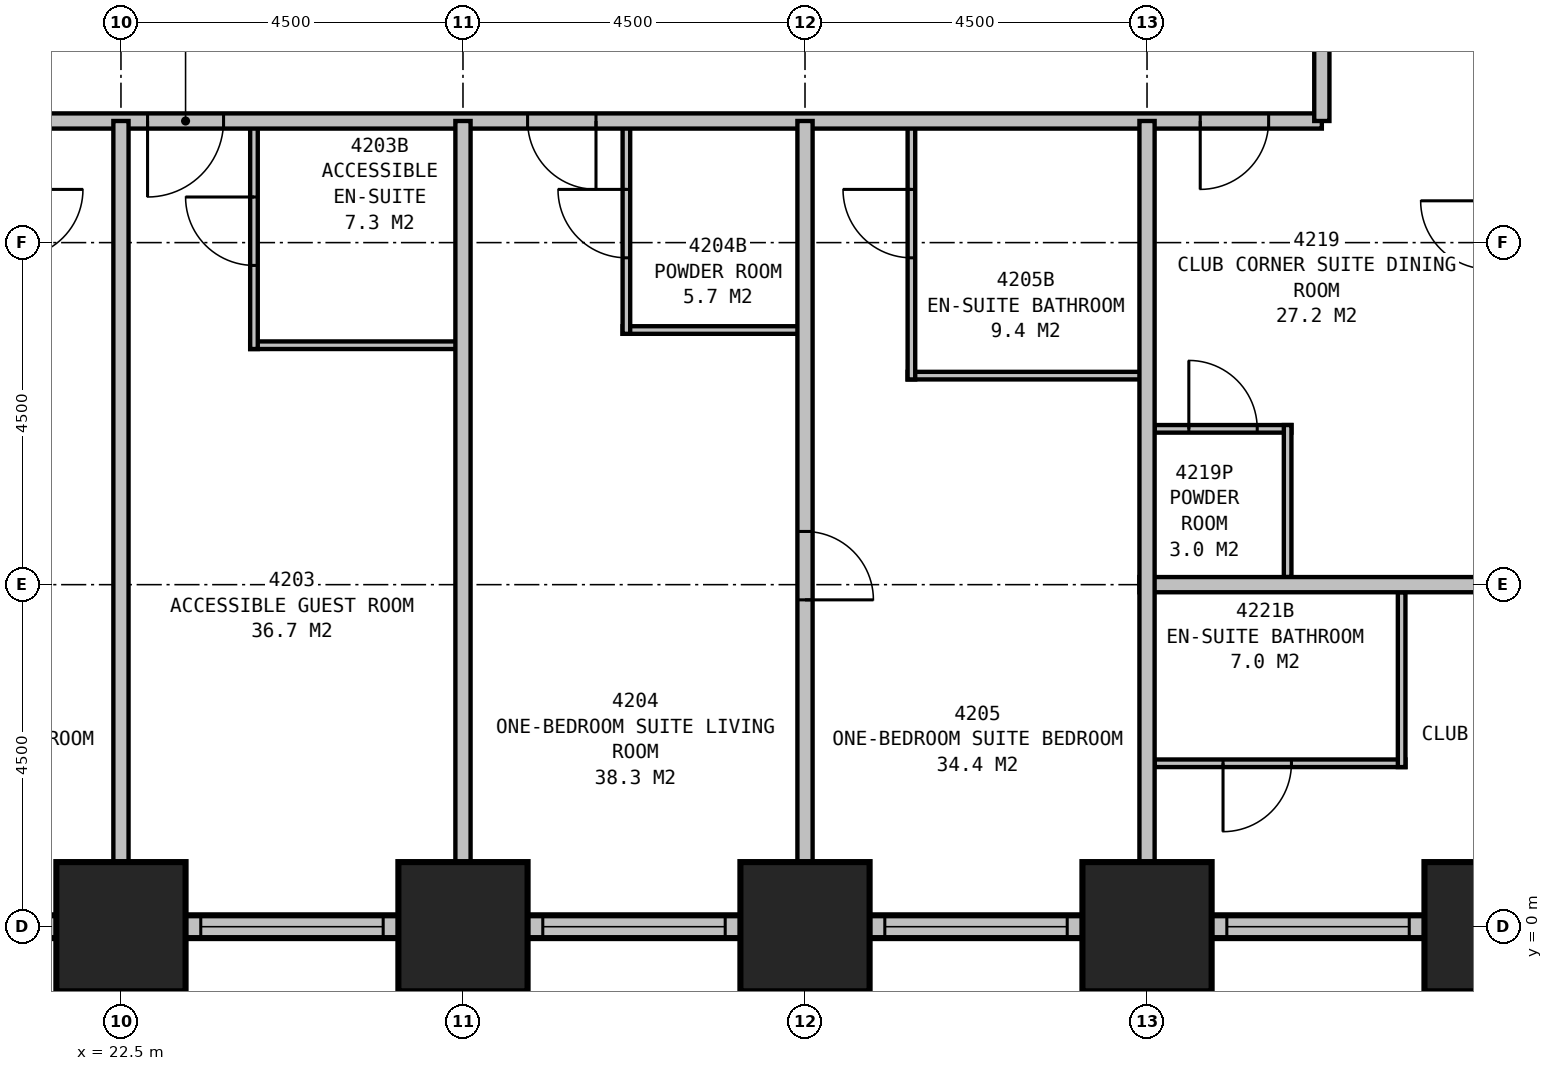
"""IFC4 building model, lengths in metres.
Left out: names, types, materials, properties, quantities, classifications, styles, units other than length and angle.
Written with IfcOpenShell. Run it as: python <this file> out.ifc"""

import sys

from ifc_helpers import new_model, si_unit, direction, frame, frame_2d, origin, origin_2d, place, context, subcontext, project, spatial, rectangle, extrude, element, fill, save


model = new_model("IFC4")
c1 = context("Model", 3, precision=1e-05, world=origin(), true_north=direction((0.0, 1.0)))
c2 = subcontext(c1, "Body", "Model", "MODEL_VIEW")
j1 = project(units=[si_unit("LENGTHUNIT", "METRE"), si_unit("PLANEANGLEUNIT", "RADIAN")], contexts=[c1])
p1 = place(None, origin())
s1 = spatial("IfcSite", under=j1, at=p1, CompositionType="ELEMENT")
p2 = place(p1, origin())
s2 = spatial("IfcBuilding", under=s1, at=p2, CompositionType="ELEMENT")
p3 = place(p2, frame((0.0, 0.0, 165.9)))
s3 = spatial("IfcBuildingStorey", under=s2, at=p3, CompositionType="ELEMENT", Elevation=165.9)
for number, where, z_axis, x_axis in (
    (1, (22.5, 0.0, 0.0), (0.0, 0.0, 1.0), (1.0, 0.0, 0.0)),
    (2, (27.0, 0.0, 0.0), (0.0, 0.0, 1.0), (1.0, 0.0, 0.0)),
    (3, (31.5, 0.0, 0.0), (0.0, 0.0, 1.0), (1.0, 0.0, 0.0)),
    (4, (36.0, 0.0, 0.0), (0.0, 0.0, 1.0), (1.0, 0.0, 0.0)),
    (5, (40.5, 0.0, 0.0), (0.0, 0.0, 1.0), (1.0, 0.0, 0.0)),
):
    element("IfcColumn", number, at=place(p3, frame(where, z_axis=z_axis, x_axis=x_axis)), inside=s3, PredefinedType="COLUMN", context=c2, shape_type="SweptSolid", body=[
        extrude(rectangle(XDim=1.7, YDim=1.7, at=origin_2d()), origin(), (0.0, 0.0, 1.0), 3.5),
    ])
p4 = place(p3, frame((8.85, 0.0, 0.0), z_axis=(0.0, 0.0, 1.0), x_axis=(1.0, 0.0, 0.0)))
e6 = element("IfcWall", 6, at=p4, inside=s3, PredefinedType="STANDARD", context=c2, shape_type="SweptSolid", body=[
    extrude(rectangle(XDim=36.3, YDim=0.3, at=frame_2d((18.15, 0.0))), origin(), (0.0, 0.0, 1.0), 2.25),
])
p5 = place(p4, frame((1.65, 0.0, 0.5)))
e7 = element("IfcOpeningElement", 7, at=p5, cuts=e6, PredefinedType="OPENING", context=c2, shape_type="SweptSolid", body=[
    extrude(rectangle(XDim=1.5, YDim=1.6, at=frame_2d((0.75, 0.8))), frame((0.0, 0.16, 0.0), z_axis=(0.0, -1.0, 0.0), x_axis=(1.0, 0.0, 0.0)), (0.0, 0.0, 1.0), 0.32),
])
p6 = place(p4, frame((5.7, 0.0, 0.5)))
e8 = element("IfcOpeningElement", 8, at=p6, cuts=e6, PredefinedType="OPENING", context=c2, shape_type="SweptSolid", body=[
    extrude(rectangle(XDim=2.4, YDim=1.6, at=frame_2d((1.2, 0.8))), frame((0.0, 0.16, 0.0), z_axis=(0.0, -1.0, 0.0), x_axis=(1.0, 0.0, 0.0)), (0.0, 0.0, 1.0), 0.32),
])
p7 = place(p4, frame((10.2, 0.0, 0.5)))
e9 = element("IfcOpeningElement", 9, at=p7, cuts=e6, PredefinedType="OPENING", context=c2, shape_type="SweptSolid", body=[
    extrude(rectangle(XDim=2.4, YDim=1.6, at=frame_2d((1.2, 0.8))), frame((0.0, 0.16, 0.0), z_axis=(0.0, -1.0, 0.0), x_axis=(1.0, 0.0, 0.0)), (0.0, 0.0, 1.0), 0.32),
])
p8 = place(p4, frame((14.7, 0.0, 0.5)))
e10 = element("IfcOpeningElement", 10, at=p8, cuts=e6, PredefinedType="OPENING", context=c2, shape_type="SweptSolid", body=[
    extrude(rectangle(XDim=2.4, YDim=1.6, at=frame_2d((1.2, 0.8))), frame((0.0, 0.16, 0.0), z_axis=(0.0, -1.0, 0.0), x_axis=(1.0, 0.0, 0.0)), (0.0, 0.0, 1.0), 0.32),
])
p9 = place(p4, frame((19.2, 0.0, 0.5)))
e11 = element("IfcOpeningElement", 11, at=p9, cuts=e6, PredefinedType="OPENING", context=c2, shape_type="SweptSolid", body=[
    extrude(rectangle(XDim=2.4, YDim=1.6, at=frame_2d((1.2, 0.8))), frame((0.0, 0.16, 0.0), z_axis=(0.0, -1.0, 0.0), x_axis=(1.0, 0.0, 0.0)), (0.0, 0.0, 1.0), 0.32),
])
p10 = place(p4, frame((23.7, 0.0, 0.5)))
e12 = element("IfcOpeningElement", 12, at=p10, cuts=e6, PredefinedType="OPENING", context=c2, shape_type="SweptSolid", body=[
    extrude(rectangle(XDim=2.4, YDim=1.6, at=frame_2d((1.2, 0.8))), frame((0.0, 0.16, 0.0), z_axis=(0.0, -1.0, 0.0), x_axis=(1.0, 0.0, 0.0)), (0.0, 0.0, 1.0), 0.32),
])
p11 = place(p4, frame((28.2, 0.0, 0.5)))
e13 = element("IfcOpeningElement", 13, at=p11, cuts=e6, PredefinedType="OPENING", context=c2, shape_type="SweptSolid", body=[
    extrude(rectangle(XDim=2.4, YDim=1.6, at=frame_2d((1.2, 0.8))), frame((0.0, 0.16, 0.0), z_axis=(0.0, -1.0, 0.0), x_axis=(1.0, 0.0, 0.0)), (0.0, 0.0, 1.0), 0.32),
])
p12 = place(p4, frame((32.7, 0.0, 0.5)))
e14 = element("IfcOpeningElement", 14, at=p12, cuts=e6, PredefinedType="OPENING", context=c2, shape_type="SweptSolid", body=[
    extrude(rectangle(XDim=2.4, YDim=1.6, at=frame_2d((1.2, 0.8))), frame((0.0, 0.16, 0.0), z_axis=(0.0, -1.0, 0.0), x_axis=(1.0, 0.0, 0.0)), (0.0, 0.0, 1.0), 0.32),
])
p13 = place(p3, frame((11.2, 10.6, 0.0), z_axis=(0.0, 0.0, 1.0), x_axis=(1.0, 0.0, 0.0)))
e15 = element("IfcWall", 15, at=p13, inside=s3, PredefinedType="PARTITIONING", context=c2, shape_type="SweptSolid", body=[
    extrude(rectangle(XDim=27.1, YDim=0.2, at=frame_2d((13.55, 0.0))), origin(), (0.0, 0.0, 1.0), 3.25),
])
p14 = place(p13, frame((4.05, 0.0, 0.0), z_axis=(0.0, 0.0, 1.0), x_axis=(-1.0, 0.0, 0.0)))
e16 = element("IfcOpeningElement", 16, at=p14, cuts=e15, PredefinedType="OPENING", context=c2, shape_type="SweptSolid", body=[
    extrude(rectangle(XDim=0.9, YDim=2.1, at=frame_2d((0.45, 1.05))), frame((0.0, 0.11, 0.0), z_axis=(0.0, -1.0, 0.0), x_axis=(1.0, 0.0, 0.0)), (0.0, 0.0, 1.0), 0.22),
])
p15 = place(p13, frame((12.65, 0.0, 0.0), z_axis=(0.0, 0.0, 1.0), x_axis=(-1.0, 0.0, 0.0)))
e17 = element("IfcOpeningElement", 17, at=p15, cuts=e15, PredefinedType="OPENING", context=c2, shape_type="SweptSolid", body=[
    extrude(rectangle(XDim=1.0, YDim=2.1, at=frame_2d((0.5, 1.05))), frame((0.0, 0.11, 0.0), z_axis=(0.0, -1.0, 0.0), x_axis=(1.0, 0.0, 0.0)), (0.0, 0.0, 1.0), 0.22),
])
p16 = place(p13, frame((17.55, 0.0, 0.0), z_axis=(0.0, 0.0, 1.0), x_axis=(-1.0, 0.0, 0.0)))
e18 = element("IfcOpeningElement", 18, at=p16, cuts=e15, PredefinedType="OPENING", context=c2, shape_type="SweptSolid", body=[
    extrude(rectangle(XDim=0.9, YDim=2.1, at=frame_2d((0.45, 1.05))), frame((0.0, 0.11, 0.0), z_axis=(0.0, -1.0, 0.0), x_axis=(1.0, 0.0, 0.0)), (0.0, 0.0, 1.0), 0.22),
])
p17 = place(p13, frame((1.6, 0.0, 0.0), z_axis=(0.0, 0.0, 1.0), x_axis=(-1.0, 0.0, 0.0)))
e19 = element("IfcOpeningElement", 19, at=p17, cuts=e15, PredefinedType="OPENING", context=c2, shape_type="SweptSolid", body=[
    extrude(rectangle(XDim=0.9, YDim=2.1, at=frame_2d((0.45, 1.05))), frame((0.0, 0.11, 0.0), z_axis=(0.0, -1.0, 0.0), x_axis=(1.0, 0.0, 0.0)), (0.0, 0.0, 1.0), 0.22),
])
p18 = place(p13, frame((26.4, 0.0, 0.0), z_axis=(0.0, 0.0, 1.0), x_axis=(-1.0, 0.0, 0.0)))
e20 = element("IfcOpeningElement", 20, at=p18, cuts=e15, PredefinedType="OPENING", context=c2, shape_type="SweptSolid", body=[
    extrude(rectangle(XDim=0.9, YDim=2.1, at=frame_2d((0.45, 1.05))), frame((0.0, 0.11, 0.0), z_axis=(0.0, -1.0, 0.0), x_axis=(1.0, 0.0, 0.0)), (0.0, 0.0, 1.0), 0.22),
])
p19 = place(p3, frame((38.3, 10.6, 0.0), z_axis=(0.0, 0.0, 1.0), x_axis=(0.0, 1.0, 0.0)))
e21 = element("IfcWall", 21, at=p19, inside=s3, PredefinedType="PARTITIONING", context=c2, shape_type="SweptSolid", body=[
    extrude(rectangle(XDim=18.7, YDim=0.2, at=frame_2d((9.35, 0.0))), origin(), (0.0, 0.0, 1.0), 3.25),
])
p20 = place(p19, frame((6.95, 0.0, 0.0), z_axis=(0.0, 0.0, 1.0), x_axis=(-1.0, 0.0, 0.0)))
e22 = element("IfcOpeningElement", 22, at=p20, cuts=e21, PredefinedType="OPENING", context=c2, shape_type="SweptSolid", body=[
    extrude(rectangle(XDim=0.9, YDim=2.1, at=frame_2d((0.45, 1.05))), frame((0.0, 0.11, 0.0), z_axis=(0.0, -1.0, 0.0), x_axis=(1.0, 0.0, 0.0)), (0.0, 0.0, 1.0), 0.22),
])
p21 = place(p19, frame((11.05, 0.0, 0.0), z_axis=(0.0, 0.0, 1.0), x_axis=(-1.0, 0.0, 0.0)))
e23 = element("IfcOpeningElement", 23, at=p21, cuts=e21, PredefinedType="OPENING", context=c2, shape_type="SweptSolid", body=[
    extrude(rectangle(XDim=0.9, YDim=2.1, at=frame_2d((0.45, 1.05))), frame((0.0, 0.11, 0.0), z_axis=(0.0, -1.0, 0.0), x_axis=(1.0, 0.0, 0.0)), (0.0, 0.0, 1.0), 0.22),
])
for number, where, z_axis, x_axis in (
    (24, (22.5, 10.6, 0.0), (0.0, 0.0, 1.0), (0.0, -1.0, 0.0)),
    (25, (27.0, 10.6, 0.0), (0.0, 0.0, 1.0), (0.0, -1.0, 0.0)),
):
    element("IfcWall", number, at=place(p3, frame(where, z_axis=z_axis, x_axis=x_axis)), inside=s3, PredefinedType="PARTITIONING", context=c2, shape_type="SweptSolid", body=[
        extrude(rectangle(XDim=10.6, YDim=0.2, at=frame_2d((5.3, 0.0))), origin(), (0.0, 0.0, 1.0), 2.25),
    ])
p22 = place(p3, frame((31.5, 10.6, 0.0), z_axis=(0.0, 0.0, 1.0), x_axis=(0.0, -1.0, 0.0)))
e26 = element("IfcWall", 26, at=p22, inside=s3, PredefinedType="PARTITIONING", context=c2, shape_type="SweptSolid", body=[
    extrude(rectangle(XDim=10.6, YDim=0.2, at=frame_2d((5.3, 0.0))), origin(), (0.0, 0.0, 1.0), 2.25),
])
p23 = place(p22, frame((5.4, 0.0, 0.0)))
e27 = element("IfcOpeningElement", 27, at=p23, cuts=e26, PredefinedType="OPENING", context=c2, shape_type="SweptSolid", body=[
    extrude(rectangle(XDim=0.9, YDim=2.1, at=frame_2d((0.45, 1.05))), frame((0.0, 0.11, 0.0), z_axis=(0.0, -1.0, 0.0), x_axis=(1.0, 0.0, 0.0)), (0.0, 0.0, 1.0), 0.22),
])
p24 = place(p3, frame((24.2, 7.65, 0.0), z_axis=(0.0, 0.0, 1.0), x_axis=(1.0, 0.0, 0.0)))
e28 = element("IfcWall", 28, at=p24, inside=s3, PredefinedType="PLUMBINGWALL", context=c2, shape_type="SweptSolid", body=[
    extrude(rectangle(XDim=2.8, YDim=0.1, at=frame_2d((1.4, 0.0))), origin(), (0.0, 0.0, 1.0), 3.25),
])
p25 = place(p3, frame((24.25, 10.6, 0.0), z_axis=(0.0, 0.0, 1.0), x_axis=(0.0, -1.0, 0.0)))
e29 = element("IfcWall", 29, at=p25, inside=s3, PredefinedType="PLUMBINGWALL", context=c2, shape_type="SweptSolid", body=[
    extrude(rectangle(XDim=3.0, YDim=0.1, at=frame_2d((1.5, 0.0))), origin(), (0.0, 0.0, 1.0), 3.25),
])
p26 = place(p25, frame((1.9, 0.0, 0.0), z_axis=(0.0, 0.0, 1.0), x_axis=(-1.0, 0.0, 0.0)))
e30 = element("IfcOpeningElement", 30, at=p26, cuts=e29, PredefinedType="OPENING", context=c2, shape_type="SweptSolid", body=[
    extrude(rectangle(XDim=0.9, YDim=2.1, at=frame_2d((0.45, 1.05))), frame((0.0, 0.06, 0.0), z_axis=(0.0, -1.0, 0.0), x_axis=(1.0, 0.0, 0.0)), (0.0, 0.0, 1.0), 0.12),
])
p27 = place(p3, frame((29.1, 7.85, 0.0), z_axis=(0.0, 0.0, 1.0), x_axis=(1.0, 0.0, 0.0)))
e31 = element("IfcWall", 31, at=p27, inside=s3, PredefinedType="PLUMBINGWALL", context=c2, shape_type="SweptSolid", body=[
    extrude(rectangle(XDim=2.4, YDim=0.1, at=frame_2d((1.2, 0.0))), origin(), (0.0, 0.0, 1.0), 3.25),
])
p28 = place(p3, frame((29.15, 10.6, 0.0), z_axis=(0.0, 0.0, 1.0), x_axis=(0.0, -1.0, 0.0)))
e32 = element("IfcWall", 32, at=p28, inside=s3, PredefinedType="PLUMBINGWALL", context=c2, shape_type="SweptSolid", body=[
    extrude(rectangle(XDim=2.8, YDim=0.1, at=frame_2d((1.4, 0.0))), origin(), (0.0, 0.0, 1.0), 3.25),
])
p29 = place(p28, frame((1.8, 0.0, 0.0), z_axis=(0.0, 0.0, 1.0), x_axis=(-1.0, 0.0, 0.0)))
e33 = element("IfcOpeningElement", 33, at=p29, cuts=e32, PredefinedType="OPENING", context=c2, shape_type="SweptSolid", body=[
    extrude(rectangle(XDim=0.9, YDim=2.1, at=frame_2d((0.45, 1.05))), frame((0.0, 0.06, 0.0), z_axis=(0.0, -1.0, 0.0), x_axis=(1.0, 0.0, 0.0)), (0.0, 0.0, 1.0), 0.12),
])
p30 = place(p3, frame((32.85, 7.25, 0.0), z_axis=(0.0, 0.0, 1.0), x_axis=(1.0, 0.0, 0.0)))
e34 = element("IfcWall", 34, at=p30, inside=s3, PredefinedType="PLUMBINGWALL", context=c2, shape_type="SweptSolid", body=[
    extrude(rectangle(XDim=3.15, YDim=0.1, at=frame_2d((1.575, 0.0))), origin(), (0.0, 0.0, 1.0), 3.25),
])
p31 = place(p3, frame((32.9, 10.6, 0.0), z_axis=(0.0, 0.0, 1.0), x_axis=(0.0, -1.0, 0.0)))
e35 = element("IfcWall", 35, at=p31, inside=s3, PredefinedType="PLUMBINGWALL", context=c2, shape_type="SweptSolid", body=[
    extrude(rectangle(XDim=3.4, YDim=0.1, at=frame_2d((1.7, 0.0))), origin(), (0.0, 0.0, 1.0), 3.25),
])
p32 = place(p31, frame((1.8, 0.0, 0.0), z_axis=(0.0, 0.0, 1.0), x_axis=(-1.0, 0.0, 0.0)))
e36 = element("IfcOpeningElement", 36, at=p32, cuts=e35, PredefinedType="OPENING", context=c2, shape_type="SweptSolid", body=[
    extrude(rectangle(XDim=0.9, YDim=2.1, at=frame_2d((0.45, 1.05))), frame((0.0, 0.06, 0.0), z_axis=(0.0, -1.0, 0.0), x_axis=(1.0, 0.0, 0.0)), (0.0, 0.0, 1.0), 0.12),
])
p33 = place(p3, frame((36.0, 10.6, 0.0), z_axis=(0.0, 0.0, 1.0), x_axis=(0.0, -1.0, 0.0)))
e37 = element("IfcWall", 37, at=p33, inside=s3, PredefinedType="PARTITIONING", context=c2, shape_type="SweptSolid", body=[
    extrude(rectangle(XDim=10.6, YDim=0.2, at=frame_2d((5.3, 0.0))), origin(), (0.0, 0.0, 1.0), 2.25),
])
p34 = place(p3, frame((35.9, 4.5, 0.0), z_axis=(0.0, 0.0, 1.0), x_axis=(1.0, 0.0, 0.0)))
e38 = element("IfcWall", 38, at=p34, inside=s3, PredefinedType="PARTITIONING", context=c2, shape_type="SweptSolid", body=[
    extrude(rectangle(XDim=9.1, YDim=0.2, at=frame_2d((4.55, 0.0))), origin(), (0.0, 0.0, 1.0), 3.25),
])
p35 = place(p34, frame((7.1, 0.0, 0.0)))
e39 = element("IfcOpeningElement", 39, at=p35, cuts=e38, PredefinedType="OPENING", context=c2, shape_type="SweptSolid", body=[
    extrude(rectangle(XDim=0.9, YDim=2.1, at=frame_2d((0.45, 1.05))), frame((0.0, 0.11, 0.0), z_axis=(0.0, -1.0, 0.0), x_axis=(1.0, 0.0, 0.0)), (0.0, 0.0, 1.0), 0.22),
])
p36 = place(p3, frame((37.85, 4.6, 0.0), z_axis=(0.0, 0.0, 1.0), x_axis=(0.0, 1.0, 0.0)))
e40 = element("IfcWall", 40, at=p36, inside=s3, PredefinedType="PLUMBINGWALL", context=c2, shape_type="SweptSolid", body=[
    extrude(rectangle(XDim=2.0, YDim=0.1, at=frame_2d((1.0, 0.0))), origin(), (0.0, 0.0, 1.0), 3.25),
])
p37 = place(p3, frame((36.1, 6.55, 0.0), z_axis=(0.0, 0.0, 1.0), x_axis=(1.0, 0.0, 0.0)))
e41 = element("IfcWall", 41, at=p37, inside=s3, PredefinedType="PLUMBINGWALL", context=c2, shape_type="SweptSolid", body=[
    extrude(rectangle(XDim=1.8, YDim=0.1, at=frame_2d((0.9, 0.0))), origin(), (0.0, 0.0, 1.0), 3.25),
])
p38 = place(p37, frame((0.45, 0.0, 0.0)))
e42 = element("IfcOpeningElement", 42, at=p38, cuts=e41, PredefinedType="OPENING", context=c2, shape_type="SweptSolid", body=[
    extrude(rectangle(XDim=0.9, YDim=2.1, at=frame_2d((0.45, 1.05))), frame((0.0, 0.06, 0.0), z_axis=(0.0, -1.0, 0.0), x_axis=(1.0, 0.0, 0.0)), (0.0, 0.0, 1.0), 0.12),
])
p39 = place(p3, frame((39.35, 4.4, 0.0), z_axis=(0.0, 0.0, 1.0), x_axis=(0.0, -1.0, 0.0)))
e43 = element("IfcWall", 43, at=p39, inside=s3, PredefinedType="PLUMBINGWALL", context=c2, shape_type="SweptSolid", body=[
    extrude(rectangle(XDim=2.3, YDim=0.1, at=frame_2d((1.15, 0.0))), origin(), (0.0, 0.0, 1.0), 3.25),
])
p40 = place(p3, frame((36.1, 2.15, 0.0), z_axis=(0.0, 0.0, 1.0), x_axis=(1.0, 0.0, 0.0)))
e44 = element("IfcWall", 44, at=p40, inside=s3, PredefinedType="PLUMBINGWALL", context=c2, shape_type="SweptSolid", body=[
    extrude(rectangle(XDim=3.3, YDim=0.1, at=frame_2d((1.65, 0.0))), origin(), (0.0, 0.0, 1.0), 3.25),
])
p41 = place(p40, frame((1.8, 0.0, 0.0), z_axis=(0.0, 0.0, 1.0), x_axis=(-1.0, 0.0, 0.0)))
e45 = element("IfcOpeningElement", 45, at=p41, cuts=e44, PredefinedType="OPENING", context=c2, shape_type="SweptSolid", body=[
    extrude(rectangle(XDim=0.9, YDim=2.1, at=frame_2d((0.45, 1.05))), frame((0.0, 0.06, 0.0), z_axis=(0.0, -1.0, 0.0), x_axis=(1.0, 0.0, 0.0)), (0.0, 0.0, 1.0), 0.12),
])
p42 = place(p8, origin())
e46 = element("IfcWindow", 46, at=p42, inside=s3, PartitioningType="SINGLE_PANEL", PredefinedType="WINDOW", context=c2, shape_type="SweptSolid", body=[
    extrude(rectangle(XDim=2.4, YDim=1.6, at=frame_2d((1.2, 0.8))), frame((0.0, 0.03, 0.0), z_axis=(0.0, -1.0, 0.0), x_axis=(1.0, 0.0, 0.0)), (0.0, 0.0, 1.0), 0.06),
])
fill(e10, e46)
p43 = place(p9, origin())
e47 = element("IfcWindow", 47, at=p43, inside=s3, PartitioningType="SINGLE_PANEL", PredefinedType="WINDOW", context=c2, shape_type="SweptSolid", body=[
    extrude(rectangle(XDim=2.4, YDim=1.6, at=frame_2d((1.2, 0.8))), frame((0.0, 0.03, 0.0), z_axis=(0.0, -1.0, 0.0), x_axis=(1.0, 0.0, 0.0)), (0.0, 0.0, 1.0), 0.06),
])
fill(e11, e47)
p44 = place(p10, origin())
e48 = element("IfcWindow", 48, at=p44, inside=s3, PartitioningType="SINGLE_PANEL", PredefinedType="WINDOW", context=c2, shape_type="SweptSolid", body=[
    extrude(rectangle(XDim=2.4, YDim=1.6, at=frame_2d((1.2, 0.8))), frame((0.0, 0.03, 0.0), z_axis=(0.0, -1.0, 0.0), x_axis=(1.0, 0.0, 0.0)), (0.0, 0.0, 1.0), 0.06),
])
fill(e12, e48)
p45 = place(p11, origin())
e49 = element("IfcWindow", 49, at=p45, inside=s3, PartitioningType="SINGLE_PANEL", PredefinedType="WINDOW", context=c2, shape_type="SweptSolid", body=[
    extrude(rectangle(XDim=2.4, YDim=1.6, at=frame_2d((1.2, 0.8))), frame((0.0, 0.03, 0.0), z_axis=(0.0, -1.0, 0.0), x_axis=(1.0, 0.0, 0.0)), (0.0, 0.0, 1.0), 0.06),
])
fill(e13, e49)
p46 = place(p15, origin())
e50 = element("IfcDoor", 50, at=p46, inside=s3, OperationType="SINGLE_SWING_RIGHT", PredefinedType="DOOR", context=c2, shape_type="SweptSolid", body=[
    extrude(rectangle(XDim=1.0, YDim=2.1, at=frame_2d((0.5, 1.05))), frame((0.0, 0.025, 0.0), z_axis=(0.0, -1.0, 0.0), x_axis=(1.0, 0.0, 0.0)), (0.0, 0.0, 1.0), 0.05),
])
fill(e17, e50)
p47 = place(p16, origin())
e51 = element("IfcDoor", 51, at=p47, inside=s3, OperationType="SINGLE_SWING_LEFT", PredefinedType="DOOR", context=c2, shape_type="SweptSolid", body=[
    extrude(rectangle(XDim=0.9, YDim=2.1, at=frame_2d((0.45, 1.05))), frame((0.0, 0.025, 0.0), z_axis=(0.0, -1.0, 0.0), x_axis=(1.0, 0.0, 0.0)), (0.0, 0.0, 1.0), 0.05),
])
fill(e18, e51)
p48 = place(p18, origin())
e52 = element("IfcDoor", 52, at=p48, inside=s3, OperationType="SINGLE_SWING_RIGHT", PredefinedType="DOOR", context=c2, shape_type="SweptSolid", body=[
    extrude(rectangle(XDim=0.9, YDim=2.1, at=frame_2d((0.45, 1.05))), frame((0.0, 0.025, 0.0), z_axis=(0.0, -1.0, 0.0), x_axis=(1.0, 0.0, 0.0)), (0.0, 0.0, 1.0), 0.05),
])
fill(e20, e52)
p49 = place(p23, origin())
e53 = element("IfcDoor", 53, at=p49, inside=s3, OperationType="SINGLE_SWING_RIGHT", PredefinedType="DOOR", context=c2, shape_type="SweptSolid", body=[
    extrude(rectangle(XDim=0.9, YDim=2.1, at=frame_2d((0.45, 1.05))), frame((0.0, 0.025, 0.0), z_axis=(0.0, -1.0, 0.0), x_axis=(1.0, 0.0, 0.0)), (0.0, 0.0, 1.0), 0.05),
])
fill(e27, e53)
p50 = place(p26, origin())
e54 = element("IfcDoor", 54, at=p50, inside=s3, OperationType="SINGLE_SWING_RIGHT", PredefinedType="DOOR", context=c2, shape_type="SweptSolid", body=[
    extrude(rectangle(XDim=0.9, YDim=2.1, at=frame_2d((0.45, 1.05))), frame((0.0, 0.025, 0.0), z_axis=(0.0, -1.0, 0.0), x_axis=(1.0, 0.0, 0.0)), (0.0, 0.0, 1.0), 0.05),
])
fill(e30, e54)
p51 = place(p29, origin())
e55 = element("IfcDoor", 55, at=p51, inside=s3, OperationType="SINGLE_SWING_RIGHT", PredefinedType="DOOR", context=c2, shape_type="SweptSolid", body=[
    extrude(rectangle(XDim=0.9, YDim=2.1, at=frame_2d((0.45, 1.05))), frame((0.0, 0.025, 0.0), z_axis=(0.0, -1.0, 0.0), x_axis=(1.0, 0.0, 0.0)), (0.0, 0.0, 1.0), 0.05),
])
fill(e33, e55)
p52 = place(p32, origin())
e56 = element("IfcDoor", 56, at=p52, inside=s3, OperationType="SINGLE_SWING_RIGHT", PredefinedType="DOOR", context=c2, shape_type="SweptSolid", body=[
    extrude(rectangle(XDim=0.9, YDim=2.1, at=frame_2d((0.45, 1.05))), frame((0.0, 0.025, 0.0), z_axis=(0.0, -1.0, 0.0), x_axis=(1.0, 0.0, 0.0)), (0.0, 0.0, 1.0), 0.05),
])
fill(e36, e56)
p53 = place(p38, origin())
e57 = element("IfcDoor", 57, at=p53, inside=s3, OperationType="SINGLE_SWING_LEFT", PredefinedType="DOOR", context=c2, shape_type="SweptSolid", body=[
    extrude(rectangle(XDim=0.9, YDim=2.1, at=frame_2d((0.45, 1.05))), frame((0.0, 0.025, 0.0), z_axis=(0.0, -1.0, 0.0), x_axis=(1.0, 0.0, 0.0)), (0.0, 0.0, 1.0), 0.05),
])
fill(e42, e57)
p54 = place(p41, origin())
e58 = element("IfcDoor", 58, at=p54, inside=s3, OperationType="SINGLE_SWING_RIGHT", PredefinedType="DOOR", context=c2, shape_type="SweptSolid", body=[
    extrude(rectangle(XDim=0.9, YDim=2.1, at=frame_2d((0.45, 1.05))), frame((0.0, 0.025, 0.0), z_axis=(0.0, -1.0, 0.0), x_axis=(1.0, 0.0, 0.0)), (0.0, 0.0, 1.0), 0.05),
])
fill(e45, e58)
save(model, sys.argv[1])
